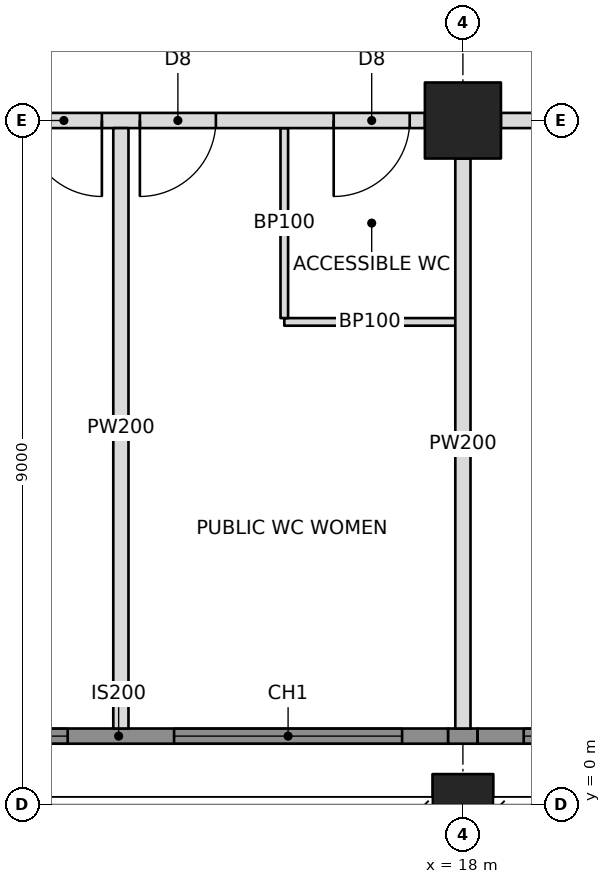
"""IFC4 building model, lengths in metres.
Left out: names, types, materials, properties, quantities, classifications, styles, units other than length and angle.
Written with IfcOpenShell. Run it as: python <this file> out.ifc"""

import sys

from ifc_helpers import new_model, si_unit, direction, frame, frame_2d, origin, origin_2d, place, context, subcontext, project, spatial, rectangle, hollow_rectangle, extrude, element, fill, save


model = new_model("IFC4")
c1 = context("Model", 3, precision=1e-05, world=origin(), true_north=direction((0.0, 1.0)))
c2 = subcontext(c1, "Body", "Model", "MODEL_VIEW")
j1 = project(units=[si_unit("LENGTHUNIT", "METRE"), si_unit("PLANEANGLEUNIT", "RADIAN")], contexts=[c1])
p1 = place(None, origin())
s1 = spatial("IfcSite", under=j1, at=p1, CompositionType="ELEMENT")
p2 = place(p1, origin())
s2 = spatial("IfcBuilding", under=s1, at=p2, CompositionType="ELEMENT")
p3 = place(p2, frame((0.0, 0.0, 160.4)))
s3 = spatial("IfcBuildingStorey", under=s2, at=p3, CompositionType="ELEMENT", Elevation=160.4)
p4 = place(p3, frame((18.0, 0.0, 0.0), z_axis=(0.0, 0.0, 1.0), x_axis=(1.0, 0.0, 0.0)))
e1 = element("IfcColumn", 1, at=p4, inside=s3, PredefinedType="COLUMN", context=c2, shape_type="SweptSolid", body=[
    extrude(hollow_rectangle(XDim=0.8, YDim=0.8, WallThickness=0.07, at=origin_2d()), origin(), (0.0, 0.0, 1.0), 3.4),
])
p5 = place(p3, frame((18.0, 9.0, 0.0), z_axis=(0.0, 0.0, 1.0), x_axis=(1.0, 0.0, 0.0)))
e2 = element("IfcColumn", 2, at=p5, inside=s3, PredefinedType="COLUMN", context=c2, shape_type="SweptSolid", body=[
    extrude(hollow_rectangle(XDim=1.0, YDim=1.0, WallThickness=0.1, at=origin_2d()), origin(), (0.0, 0.0, 1.0), 3.4),
])
p6 = place(p3, frame((9.5, 9.0, 0.0), z_axis=(0.0, 0.0, 1.0), x_axis=(1.0, 0.0, 0.0)))
e3 = element("IfcWall", 3, at=p6, inside=s3, PredefinedType="PARTITIONING", context=c2, shape_type="SweptSolid", body=[
    extrude(rectangle(XDim=8.0, YDim=0.2, at=frame_2d((4.0, 0.0))), origin(), (0.0, 0.0, 1.0), 2.405),
])
p7 = place(p6, frame((2.75, 0.0, 0.0)))
e4 = element("IfcOpeningElement", 4, at=p7, cuts=e3, PredefinedType="OPENING", context=c2, shape_type="SweptSolid", body=[
    extrude(rectangle(XDim=1.0, YDim=2.1, at=frame_2d((0.5, 1.05))), frame((0.0, 0.11, 0.0), z_axis=(0.0, -1.0, 0.0), x_axis=(1.0, 0.0, 0.0)), (0.0, 0.0, 1.0), 0.22),
])
p8 = place(p6, frame((6.8, 0.0, 0.0)))
e5 = element("IfcOpeningElement", 5, at=p8, cuts=e3, PredefinedType="OPENING", context=c2, shape_type="SweptSolid", body=[
    extrude(rectangle(XDim=1.0, YDim=2.1, at=frame_2d((0.5, 1.05))), frame((0.0, 0.11, 0.0), z_axis=(0.0, -1.0, 0.0), x_axis=(1.0, 0.0, 0.0)), (0.0, 0.0, 1.0), 0.22),
])
p9 = place(p6, frame((4.25, 0.0, 0.0)))
e6 = element("IfcOpeningElement", 6, at=p9, cuts=e3, PredefinedType="OPENING", context=c2, shape_type="SweptSolid", body=[
    extrude(rectangle(XDim=1.0, YDim=2.1, at=frame_2d((0.5, 1.05))), frame((0.0, 0.11, 0.0), z_axis=(0.0, -1.0, 0.0), x_axis=(1.0, 0.0, 0.0)), (0.0, 0.0, 1.0), 0.22),
])
p10 = place(p3, frame((18.5, 9.0, 0.0), z_axis=(0.0, 0.0, 1.0), x_axis=(1.0, 0.0, 0.0)))
e7 = element("IfcWall", 7, at=p10, inside=s3, PredefinedType="PARTITIONING", context=c2, shape_type="SweptSolid", body=[
    extrude(rectangle(XDim=2.85, YDim=0.2, at=frame_2d((1.425, 0.0))), origin(), (0.0, 0.0, 1.0), 2.405),
])
p11 = place(p3, frame((18.0, 8.5, 0.0), z_axis=(0.0, 0.0, 1.0), x_axis=(0.0, -1.0, 0.0)))
e8 = element("IfcWall", 8, at=p11, inside=s3, PredefinedType="PARTITIONING", context=c2, shape_type="SweptSolid", body=[
    extrude(rectangle(XDim=7.5, YDim=0.2, at=frame_2d((3.75, 0.0))), origin(), (0.0, 0.0, 1.0), 2.405),
])
p12 = place(p3, frame((13.5, 8.9, 0.0), z_axis=(0.0, 0.0, 1.0), x_axis=(0.0, -1.0, 0.0)))
e9 = element("IfcWall", 9, at=p12, inside=s3, PredefinedType="PARTITIONING", context=c2, shape_type="SweptSolid", body=[
    extrude(rectangle(XDim=7.9, YDim=0.2, at=frame_2d((3.95, 0.0))), origin(), (0.0, 0.0, 1.0), 2.404),
])
p13 = place(p3, frame((15.65, 6.35, 0.0), z_axis=(0.0, 0.0, 1.0), x_axis=(1.0, 0.0, 0.0)))
e10 = element("IfcWall", 10, at=p13, inside=s3, PredefinedType="PARTITIONING", context=c2, shape_type="SweptSolid", body=[
    extrude(rectangle(XDim=2.25, YDim=0.1, at=frame_2d((1.125, 0.0))), origin(), (0.0, 0.0, 1.0), 2.404),
])
p14 = place(p3, frame((15.65, 8.9, 0.0), z_axis=(0.0, 0.0, 1.0), x_axis=(0.0, -1.0, 0.0)))
e11 = element("IfcWall", 11, at=p14, inside=s3, PredefinedType="PARTITIONING", context=c2, shape_type="SweptSolid", body=[
    extrude(rectangle(XDim=2.5, YDim=0.1, at=frame_2d((1.25, 0.0))), origin(), (0.0, 0.0, 1.0), 2.404),
])
p15 = place(p3, frame((9.135, 0.9, 0.0), z_axis=(0.0, 0.0, 1.0), x_axis=(1.0, 0.0, 0.0)))
e12 = element("IfcWall", 12, at=p15, inside=s3, PredefinedType="SOLIDWALL", context=c2, shape_type="SweptSolid", body=[
    extrude(rectangle(XDim=8.671, YDim=0.2, at=frame_2d((4.335, 0.0))), origin(), (0.0, 0.0, 1.0), 3.2),
])
p16 = place(p15, frame((0.665, 0.0, 0.6)))
e13 = element("IfcOpeningElement", 13, at=p16, cuts=e12, PredefinedType="OPENING", context=c2, shape_type="SweptSolid", body=[
    extrude(rectangle(XDim=3.0, YDim=2.2, at=frame_2d((1.5, 1.1))), frame((0.0, 0.11, 0.0), z_axis=(0.0, -1.0, 0.0), x_axis=(1.0, 0.0, 0.0)), (0.0, 0.0, 1.0), 0.22),
])
p17 = place(p15, frame((5.065, 0.0, 0.6)))
e14 = element("IfcOpeningElement", 14, at=p17, cuts=e12, PredefinedType="OPENING", context=c2, shape_type="SweptSolid", body=[
    extrude(rectangle(XDim=3.0, YDim=2.2, at=frame_2d((1.5, 1.1))), frame((0.0, 0.11, 0.0), z_axis=(0.0, -1.0, 0.0), x_axis=(1.0, 0.0, 0.0)), (0.0, 0.0, 1.0), 0.22),
])
p18 = place(p3, frame((17.806, 0.9, 0.0), z_axis=(0.0, 0.0, 1.0), x_axis=(1.0, 0.0, 0.0)))
e15 = element("IfcWall", 15, at=p18, inside=s3, PredefinedType="SOLIDWALL", context=c2, shape_type="SweptSolid", body=[
    extrude(rectangle(XDim=0.388, YDim=0.2, at=frame_2d((0.194, 0.0))), origin(), (0.0, 0.0, 1.0), 2.404),
])
p19 = place(p3, frame((18.194, 0.9, 0.0), z_axis=(0.0, 0.0, 1.0), x_axis=(1.0, 0.0, 0.0)))
e16 = element("IfcWall", 16, at=p19, inside=s3, PredefinedType="SOLIDWALL", context=c2, shape_type="SweptSolid", body=[
    extrude(rectangle(XDim=8.612, YDim=0.2, at=frame_2d((4.306, 0.0))), origin(), (0.0, 0.0, 1.0), 3.2),
])
p20 = place(p19, frame((0.606, 0.0, 0.6)))
e17 = element("IfcOpeningElement", 17, at=p20, cuts=e16, PredefinedType="OPENING", context=c2, shape_type="SweptSolid", body=[
    extrude(rectangle(XDim=3.0, YDim=2.2, at=frame_2d((1.5, 1.1))), frame((0.0, 0.11, 0.0), z_axis=(0.0, -1.0, 0.0), x_axis=(1.0, 0.0, 0.0)), (0.0, 0.0, 1.0), 0.22),
])
p21 = place(p19, frame((5.006, 0.0, 0.6)))
e18 = element("IfcOpeningElement", 18, at=p21, cuts=e16, PredefinedType="OPENING", context=c2, shape_type="SweptSolid", body=[
    extrude(rectangle(XDim=3.0, YDim=2.2, at=frame_2d((1.5, 1.1))), frame((0.0, 0.11, 0.0), z_axis=(0.0, -1.0, 0.0), x_axis=(1.0, 0.0, 0.0)), (0.0, 0.0, 1.0), 0.22),
])
p22 = place(p16, origin())
e19 = element("IfcWindow", 19, at=p22, inside=s3, PartitioningType="TRIPLE_PANEL_VERTICAL", PredefinedType="WINDOW", context=c2, shape_type="SweptSolid", body=[
    extrude(rectangle(XDim=3.0, YDim=2.2, at=frame_2d((1.5, 1.1))), frame((0.0, 0.03, 0.0), z_axis=(0.0, -1.0, 0.0), x_axis=(1.0, 0.0, 0.0)), (0.0, 0.0, 1.0), 0.06),
])
fill(e13, e19)
p23 = place(p17, origin())
e20 = element("IfcWindow", 20, at=p23, inside=s3, PartitioningType="TRIPLE_PANEL_VERTICAL", PredefinedType="WINDOW", context=c2, shape_type="SweptSolid", body=[
    extrude(rectangle(XDim=3.0, YDim=2.2, at=frame_2d((1.5, 1.1))), frame((0.0, 0.03, 0.0), z_axis=(0.0, -1.0, 0.0), x_axis=(1.0, 0.0, 0.0)), (0.0, 0.0, 1.0), 0.06),
])
fill(e14, e20)
p24 = place(p20, origin())
e21 = element("IfcWindow", 21, at=p24, inside=s3, PartitioningType="TRIPLE_PANEL_VERTICAL", PredefinedType="WINDOW", context=c2, shape_type="SweptSolid", body=[
    extrude(rectangle(XDim=3.0, YDim=2.2, at=frame_2d((1.5, 1.1))), frame((0.0, 0.03, 0.0), z_axis=(0.0, -1.0, 0.0), x_axis=(1.0, 0.0, 0.0)), (0.0, 0.0, 1.0), 0.06),
])
fill(e17, e21)
p25 = place(p7, frame((1.0, 0.0, 0.0), z_axis=(0.0, 0.0, 1.0), x_axis=(-1.0, 0.0, 0.0)))
e22 = element("IfcDoor", 22, at=p25, inside=s3, OperationType="SINGLE_SWING_LEFT", PredefinedType="DOOR", context=c2, shape_type="SweptSolid", body=[
    extrude(rectangle(XDim=1.0, YDim=2.1, at=frame_2d((0.5, 1.05))), frame((0.0, 0.025, 0.0), z_axis=(0.0, -1.0, 0.0), x_axis=(1.0, 0.0, 0.0)), (0.0, 0.0, 1.0), 0.05),
])
fill(e4, e22)
p26 = place(p8, frame((1.0, 0.0, 0.0), z_axis=(0.0, 0.0, 1.0), x_axis=(-1.0, 0.0, 0.0)))
e23 = element("IfcDoor", 23, at=p26, inside=s3, OperationType="SINGLE_SWING_RIGHT", PredefinedType="DOOR", context=c2, shape_type="SweptSolid", body=[
    extrude(rectangle(XDim=1.0, YDim=2.1, at=frame_2d((0.5, 1.05))), frame((0.0, 0.025, 0.0), z_axis=(0.0, -1.0, 0.0), x_axis=(1.0, 0.0, 0.0)), (0.0, 0.0, 1.0), 0.05),
])
fill(e5, e23)
p27 = place(p9, frame((1.0, 0.0, 0.0), z_axis=(0.0, 0.0, 1.0), x_axis=(-1.0, 0.0, 0.0)))
e24 = element("IfcDoor", 24, at=p27, inside=s3, OperationType="SINGLE_SWING_RIGHT", PredefinedType="DOOR", context=c2, shape_type="SweptSolid", body=[
    extrude(rectangle(XDim=1.0, YDim=2.1, at=frame_2d((0.5, 1.05))), frame((0.0, 0.025, 0.0), z_axis=(0.0, -1.0, 0.0), x_axis=(1.0, 0.0, 0.0)), (0.0, 0.0, 1.0), 0.05),
])
fill(e6, e24)
save(model, sys.argv[1])
